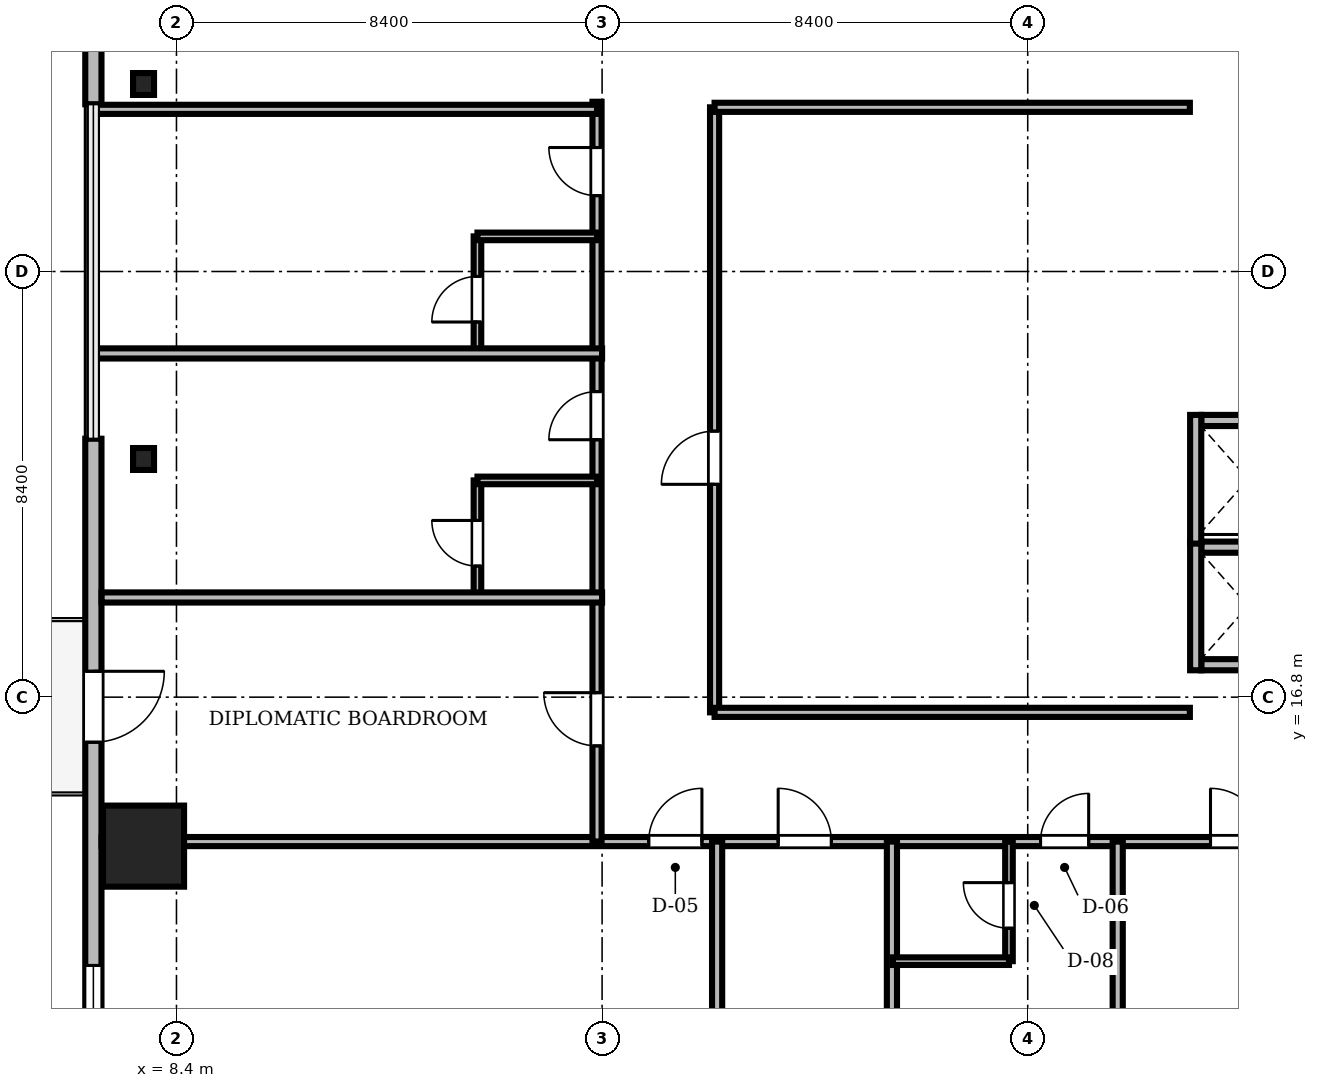
"""IFC4 building model, lengths in metres.
Left out: names, types, materials, properties, quantities, classifications, styles, units other than length and angle.
Written with IfcOpenShell. Run it as: python <this file> out.ifc"""

import sys

from ifc_helpers import new_model, si_unit, direction, frame, frame_2d, origin, origin_2d, place, context, subcontext, project, spatial, rectangle, i_section, extrude, source, transform, mapped, element, fill, save


model = new_model("IFC4")
c1 = context("Model", 3, precision=1e-05, world=origin(), true_north=direction((0.0, 1.0)))
c2 = subcontext(c1, "Body", "Model", "MODEL_VIEW")
j1 = project(units=[si_unit("LENGTHUNIT", "METRE"), si_unit("PLANEANGLEUNIT", "RADIAN")], contexts=[c1])
p1 = place(None, origin())
s1 = spatial("IfcSite", under=j1, at=p1, CompositionType="ELEMENT")
p2 = place(p1, origin())
s2 = spatial("IfcBuilding", under=s1, at=p2, CompositionType="ELEMENT")
p3 = place(p2, frame((0.0, 0.0, 152.0)))
s3 = spatial("IfcBuildingStorey", under=s2, at=p3, CompositionType="ELEMENT", Elevation=152.0)
m1 = source(origin(), c2, "Body", "SweptSolid", [
    extrude(rectangle(XDim=1.6, YDim=1.6, at=origin_2d()), origin(), (0.0, 0.0, 1.0), 3.46),
])
p4 = place(p3, frame((7.75, 13.86, 0.0), z_axis=(0.0, 0.0, 1.0), x_axis=(1.0, 0.0, 0.0)))
e1 = element("IfcColumn", 1, at=p4, inside=s3, PredefinedType="COLUMN", context=c2, shape_type="MappedRepresentation", body=[
    mapped(m1, transform((0.0, 0.0, 0.0), scale=1.0)),
])
m2 = source(origin(), c2, "Body", "SweptSolid", [
    extrude(i_section(OverallWidth=0.414, OverallDepth=0.432, WebThickness=0.026, FlangeThickness=0.04, FilletRadius=0.015, at=origin_2d()), origin(), (0.0, 0.0, 1.0), 3.46),
])
for number, where, z_axis, x_axis in (
    (2, (7.75, 28.9, 0.0), (0.0, 0.0, 1.0), (1.0, 0.0, 0.0)),
    (3, (7.75, 21.5, 0.0), (0.0, 0.0, 1.0), (1.0, 0.0, 0.0)),
):
    element("IfcColumn", number, at=place(p3, frame(where, z_axis=z_axis, x_axis=x_axis)), inside=s3, PredefinedType="COLUMN", context=c2, shape_type="MappedRepresentation", body=[
        mapped(m2, transform((0.0, 0.0, 0.0), scale=1.0)),
    ])
m3 = source(origin(), c2, "Body", "SweptSolid", [
    extrude(rectangle(XDim=15.6, YDim=0.32, at=frame_2d((7.8, 0.0))), origin(), (0.0, 0.0, 1.0), 3.46),
])
p5 = place(p3, frame((6.76, 44.1, 0.0), z_axis=(0.0, 0.0, 1.0), x_axis=(0.0, -1.0, 0.0)))
e4 = element("IfcWall", 4, at=p5, inside=s3, PredefinedType="SOLIDWALL", context=c2, shape_type="MappedRepresentation", body=[
    mapped(m3, transform((0.0, 0.0, 0.0), scale=1.0)),
])
m4 = source(origin(), c2, "Body", "SweptSolid", [
    extrude(rectangle(XDim=2.2, YDim=2.4, at=frame_2d((1.1, 1.2))), frame((0.0, 0.17, 0.0), z_axis=(0.0, -1.0, 0.0), x_axis=(1.0, 0.0, 0.0)), (0.0, 0.0, 1.0), 0.34),
])
p6 = place(p5, frame((3.005, 0.0, 0.72)))
e5 = element("IfcOpeningElement", 5, at=p6, cuts=e4, PredefinedType="OPENING", context=c2, shape_type="MappedRepresentation", body=[
    mapped(m4, transform((0.0, 0.0, 0.0), scale=1.0)),
])
m5 = source(origin(), c2, "Body", "SweptSolid", [
    extrude(rectangle(XDim=15.6, YDim=0.32, at=frame_2d((7.8, 0.0))), origin(), (0.0, 0.0, 1.0), 3.46),
])
p7 = place(p3, frame((6.76, 21.9, 0.0), z_axis=(0.0, 0.0, 1.0), x_axis=(0.0, -1.0, 0.0)))
e6 = element("IfcWall", 6, at=p7, inside=s3, PredefinedType="SOLIDWALL", context=c2, shape_type="MappedRepresentation", body=[
    mapped(m5, transform((0.0, 0.0, 0.0), scale=1.0)),
])
m6 = source(origin(), c2, "Body", "SweptSolid", [
    extrude(rectangle(XDim=1.4, YDim=2.3, at=frame_2d((0.7, 1.15))), frame((0.0, 0.17, 0.0), z_axis=(0.0, -1.0, 0.0), x_axis=(1.0, 0.0, 0.0)), (0.0, 0.0, 1.0), 0.34),
])
p8 = place(p7, frame((4.59, 0.0, 0.0)))
e7 = element("IfcOpeningElement", 7, at=p8, cuts=e6, PredefinedType="OPENING", context=c2, shape_type="MappedRepresentation", body=[
    mapped(m6, transform((0.0, 0.0, 0.0), scale=1.0)),
])
p9 = place(p7, frame((10.395, 0.0, 0.72)))
e8 = element("IfcOpeningElement", 8, at=p9, cuts=e6, PredefinedType="OPENING", context=c2, shape_type="MappedRepresentation", body=[
    mapped(m4, transform((0.0, 0.0, 0.0), scale=1.0)),
])
m7 = source(origin(), c2, "Body", "SweptSolid", [
    extrude(rectangle(XDim=1.85, YDim=0.22, at=frame_2d((0.925, 0.0))), origin(), (0.0, 0.0, 1.0), 3.46),
])
for number, where, z_axis, x_axis in (
    (9, (28.625, 17.44, 0.0), (0.0, 0.0, 1.0), (1.0, 0.0, 0.0)),
    (10, (28.625, 19.76, 0.0), (0.0, 0.0, 1.0), (1.0, 0.0, 0.0)),
):
    element("IfcWall", number, at=place(p3, frame(where, z_axis=z_axis, x_axis=x_axis)), inside=s3, PredefinedType="SOLIDWALL", context=c2, shape_type="MappedRepresentation", body=[
        mapped(m7, transform((0.0, 0.0, 0.0), scale=1.0)),
    ])
m8 = source(origin(), c2, "Body", "SweptSolid", [
    extrude(rectangle(XDim=2.54, YDim=0.22, at=frame_2d((1.27, 0.0))), origin(), (0.0, 0.0, 1.0), 3.46),
])
p10 = place(p3, frame((28.515, 17.33, 0.0), z_axis=(0.0, 0.0, 1.0), x_axis=(0.0, 1.0, 0.0)))
e11 = element("IfcWall", 11, at=p10, inside=s3, PredefinedType="SOLIDWALL", context=c2, shape_type="MappedRepresentation", body=[
    mapped(m8, transform((0.0, 0.0, 0.0), scale=1.0)),
])
p11 = place(p3, frame((28.625, 22.26, 0.0), z_axis=(0.0, 0.0, 1.0), x_axis=(1.0, 0.0, 0.0)))
e12 = element("IfcWall", 12, at=p11, inside=s3, PredefinedType="SOLIDWALL", context=c2, shape_type="MappedRepresentation", body=[
    mapped(m7, transform((0.0, 0.0, 0.0), scale=1.0)),
])
p12 = place(p3, frame((28.515, 19.83, 0.0), z_axis=(0.0, 0.0, 1.0), x_axis=(0.0, 1.0, 0.0)))
e13 = element("IfcWall", 13, at=p12, inside=s3, PredefinedType="SOLIDWALL", context=c2, shape_type="MappedRepresentation", body=[
    mapped(m8, transform((0.0, 0.0, 0.0), scale=1.0)),
])
m9 = source(origin(), c2, "Body", "SweptSolid", [
    extrude(rectangle(XDim=46.156, YDim=0.18, at=frame_2d((23.078, 0.0))), origin(), (0.0, 0.0, 1.0), 2.702),
])
p13 = place(p3, frame((6.922, 13.95, 0.0), z_axis=(0.0, 0.0, 1.0), x_axis=(1.0, 0.0, 0.0)))
e14 = element("IfcWall", 14, at=p13, inside=s3, PredefinedType="PARTITIONING", context=c2, shape_type="MappedRepresentation", body=[
    mapped(m9, transform((0.0, 0.0, 0.0), scale=1.0)),
])
m10 = source(origin(), c2, "Body", "SweptSolid", [
    extrude(rectangle(XDim=1.05, YDim=2.2, at=frame_2d((0.525, 1.1))), frame((0.0, 0.1, 0.0), z_axis=(0.0, -1.0, 0.0), x_axis=(1.0, 0.0, 0.0)), (0.0, 0.0, 1.0), 0.2),
])
p14 = place(p13, frame((10.798, 0.0, 0.0)))
e15 = element("IfcOpeningElement", 15, at=p14, cuts=e14, PredefinedType="OPENING", context=c2, shape_type="MappedRepresentation", body=[
    mapped(m10, transform((0.0, 0.0, 0.0), scale=1.0)),
])
p15 = place(p13, frame((13.353, 0.0, 0.0)))
e16 = element("IfcOpeningElement", 16, at=p15, cuts=e14, PredefinedType="OPENING", context=c2, shape_type="MappedRepresentation", body=[
    mapped(m10, transform((0.0, 0.0, 0.0), scale=1.0)),
])
m11 = source(origin(), c2, "Body", "SweptSolid", [
    extrude(rectangle(XDim=0.95, YDim=2.15, at=frame_2d((0.475, 1.075))), frame((0.0, 0.1, 0.0), z_axis=(0.0, -1.0, 0.0), x_axis=(1.0, 0.0, 0.0)), (0.0, 0.0, 1.0), 0.2),
])
p16 = place(p13, frame((18.531, 0.0, 0.0)))
e17 = element("IfcOpeningElement", 17, at=p16, cuts=e14, PredefinedType="OPENING", context=c2, shape_type="MappedRepresentation", body=[
    mapped(m11, transform((0.0, 0.0, 0.0), scale=1.0)),
])
p17 = place(p13, frame((21.885, 0.0, 0.0)))
e18 = element("IfcOpeningElement", 18, at=p17, cuts=e14, PredefinedType="OPENING", context=c2, shape_type="MappedRepresentation", body=[
    mapped(m10, transform((0.0, 0.0, 0.0), scale=1.0)),
])
p18 = place(p13, frame((26.588, 0.0, 0.0)))
e19 = element("IfcOpeningElement", 19, at=p18, cuts=e14, PredefinedType="OPENING", context=c2, shape_type="MappedRepresentation", body=[
    mapped(m10, transform((0.0, 0.0, 0.0), scale=1.0)),
])
p19 = place(p13, frame((32.516, 0.0, 0.0)))
e20 = element("IfcOpeningElement", 20, at=p19, cuts=e14, PredefinedType="OPENING", context=c2, shape_type="MappedRepresentation", body=[
    mapped(m11, transform((0.0, 0.0, 0.0), scale=1.0)),
])
p20 = place(p13, frame((36.744, 0.0, 0.0)))
e21 = element("IfcOpeningElement", 21, at=p20, cuts=e14, PredefinedType="OPENING", context=c2, shape_type="MappedRepresentation", body=[
    mapped(m10, transform((0.0, 0.0, 0.0), scale=1.0)),
])
p21 = place(p13, frame((41.828, 0.0, 0.0)))
e22 = element("IfcOpeningElement", 22, at=p21, cuts=e14, PredefinedType="OPENING", context=c2, shape_type="MappedRepresentation", body=[
    mapped(m10, transform((0.0, 0.0, 0.0), scale=1.0)),
])
m12 = source(origin(), c2, "Body", "SweptSolid", [
    extrude(rectangle(XDim=14.6, YDim=0.18, at=frame_2d((7.3, 0.0))), origin(), (0.0, 0.0, 1.0), 2.852),
])
p22 = place(p3, frame((16.7, 13.95, 0.0), z_axis=(0.0, 0.0, 1.0), x_axis=(0.0, 1.0, 0.0)))
e23 = element("IfcWall", 23, at=p22, inside=s3, PredefinedType="PARTITIONING", context=c2, shape_type="MappedRepresentation", body=[
    mapped(m12, transform((0.0, 0.0, 0.0), scale=1.0)),
])
p23 = place(p22, frame((1.888, 0.0, 0.0)))
e24 = element("IfcOpeningElement", 24, at=p23, cuts=e23, PredefinedType="OPENING", context=c2, shape_type="MappedRepresentation", body=[
    mapped(m10, transform((0.0, 0.0, 0.0), scale=1.0)),
])
p24 = place(p22, frame((7.93, 0.0, 0.0)))
e25 = element("IfcOpeningElement", 25, at=p24, cuts=e23, PredefinedType="OPENING", context=c2, shape_type="MappedRepresentation", body=[
    mapped(m11, transform((0.0, 0.0, 0.0), scale=1.0)),
])
p25 = place(p22, frame((12.747, 0.0, 0.0)))
e26 = element("IfcOpeningElement", 26, at=p25, cuts=e23, PredefinedType="OPENING", context=c2, shape_type="MappedRepresentation", body=[
    mapped(m11, transform((0.0, 0.0, 0.0), scale=1.0)),
])
m13 = source(origin(), c2, "Body", "SweptSolid", [
    extrude(rectangle(XDim=11.94, YDim=0.18, at=frame_2d((5.97, 0.0))), origin(), (0.0, 0.0, 1.0), 2.852),
])
p26 = place(p3, frame((19.02, 16.5, 0.0), z_axis=(0.0, 0.0, 1.0), x_axis=(0.0, 1.0, 0.0)))
e27 = element("IfcWall", 27, at=p26, inside=s3, PredefinedType="PARTITIONING", context=c2, shape_type="MappedRepresentation", body=[
    mapped(m13, transform((0.0, 0.0, 0.0), scale=1.0)),
])
p27 = place(p26, frame((4.5, 0.0, 0.0)))
e28 = element("IfcOpeningElement", 28, at=p27, cuts=e27, PredefinedType="OPENING", context=c2, shape_type="MappedRepresentation", body=[
    mapped(m10, transform((0.0, 0.0, 0.0), scale=1.0)),
])
m14 = source(origin(), c2, "Body", "SweptSolid", [
    extrude(rectangle(XDim=2.36, YDim=0.15, at=frame_2d((1.18, 0.0))), origin(), (0.0, 0.0, 1.0), 3.122),
])
p28 = place(p3, frame((24.83, 11.59, 0.0), z_axis=(0.0, 0.0, 1.0), x_axis=(0.0, 1.0, 0.0)))
e29 = element("IfcWall", 29, at=p28, inside=s3, PredefinedType="PARTITIONING", context=c2, shape_type="MappedRepresentation", body=[
    mapped(m14, transform((0.0, 0.0, 0.0), scale=1.0)),
])
m15 = source(origin(), c2, "Body", "SweptSolid", [
    extrude(rectangle(XDim=0.9, YDim=2.1, at=frame_2d((0.45, 1.05))), frame((0.0, 0.085, 0.0), z_axis=(0.0, -1.0, 0.0), x_axis=(1.0, 0.0, 0.0)), (0.0, 0.0, 1.0), 0.17),
])
p29 = place(p28, frame((0.65, 0.0, 0.0)))
e30 = element("IfcOpeningElement", 30, at=p29, cuts=e29, PredefinedType="OPENING", context=c2, shape_type="MappedRepresentation", body=[
    mapped(m15, transform((0.0, 0.0, 0.0), scale=1.0)),
])
m16 = source(origin(), c2, "Body", "SweptSolid", [
    extrude(rectangle(XDim=2.29, YDim=0.15, at=frame_2d((1.145, 0.0))), origin(), (0.0, 0.0, 1.0), 2.852),
])
p30 = place(p3, frame((14.34, 18.787, 0.0), z_axis=(0.0, 0.0, 1.0), x_axis=(0.0, 1.0, 0.0)))
e31 = element("IfcWall", 31, at=p30, inside=s3, PredefinedType="PARTITIONING", context=c2, shape_type="MappedRepresentation", body=[
    mapped(m16, transform((0.0, 0.0, 0.0), scale=1.0)),
])
p31 = place(p30, frame((0.6, 0.0, 0.0)))
e32 = element("IfcOpeningElement", 32, at=p31, cuts=e31, PredefinedType="OPENING", context=c2, shape_type="MappedRepresentation", body=[
    mapped(m15, transform((0.0, 0.0, 0.0), scale=1.0)),
])
m17 = source(origin(), c2, "Body", "SweptSolid", [
    extrude(rectangle(XDim=2.29, YDim=0.15, at=frame_2d((1.145, 0.0))), origin(), (0.0, 0.0, 1.0), 3.122),
])
p32 = place(p3, frame((14.34, 23.603, 0.0), z_axis=(0.0, 0.0, 1.0), x_axis=(0.0, 1.0, 0.0)))
e33 = element("IfcWall", 33, at=p32, inside=s3, PredefinedType="PARTITIONING", context=c2, shape_type="MappedRepresentation", body=[
    mapped(m17, transform((0.0, 0.0, 0.0), scale=1.0)),
])
p33 = place(p32, frame((0.6, 0.0, 0.0)))
e34 = element("IfcOpeningElement", 34, at=p33, cuts=e33, PredefinedType="OPENING", context=c2, shape_type="MappedRepresentation", body=[
    mapped(m15, transform((0.0, 0.0, 0.0), scale=1.0)),
])
m18 = source(origin(), c2, "Body", "SweptSolid", [
    extrude(rectangle(XDim=11.828, YDim=0.2, at=frame_2d((5.914, 0.0))), origin(), (0.0, 0.0, 1.0), 2.702),
])
for number, where, z_axis, x_axis in (
    (35, (19.07, 2.122, 0.0), (0.0, 0.0, 1.0), (0.0, 1.0, 0.0)),
    (36, (22.52, 2.122, 0.0), (0.0, 0.0, 1.0), (0.0, 1.0, 0.0)),
):
    element("IfcWall", number, at=place(p3, frame(where, z_axis=z_axis, x_axis=x_axis)), inside=s3, PredefinedType="PARTITIONING", context=c2, shape_type="MappedRepresentation", body=[
        mapped(m18, transform((0.0, 0.0, 0.0), scale=1.0)),
    ])
m19 = source(origin(), c2, "Body", "SweptSolid", [
    extrude(rectangle(XDim=12.02, YDim=0.2, at=frame_2d((6.01, 0.0))), origin(), (0.0, 0.0, 1.0), 2.702),
])
p34 = place(p3, frame((26.976, 1.93, 0.0), z_axis=(0.0, 0.0, 1.0), x_axis=(0.0, 1.0, 0.0)))
e37 = element("IfcWall", 37, at=p34, inside=s3, PredefinedType="PARTITIONING", context=c2, shape_type="MappedRepresentation", body=[
    mapped(m19, transform((0.0, 0.0, 0.0), scale=1.0)),
])
m20 = source(origin(), c2, "Body", "SweptSolid", [
    extrude(rectangle(XDim=9.878, YDim=0.2, at=frame_2d((4.939, 0.0))), origin(), (0.0, 0.0, 1.0), 2.702),
])
p35 = place(p3, frame((6.922, 18.767, 0.0), z_axis=(0.0, 0.0, 1.0), x_axis=(1.0, 0.0, 0.0)))
e38 = element("IfcWall", 38, at=p35, inside=s3, PredefinedType="PARTITIONING", context=c2, shape_type="MappedRepresentation", body=[
    mapped(m20, transform((0.0, 0.0, 0.0), scale=1.0)),
])
m21 = source(origin(), c2, "Body", "SweptSolid", [
    extrude(rectangle(XDim=10.07, YDim=0.2, at=frame_2d((5.035, 0.0))), origin(), (0.0, 0.0, 1.0), 2.702),
])
p36 = place(p3, frame((6.73, 23.583, 0.0), z_axis=(0.0, 0.0, 1.0), x_axis=(1.0, 0.0, 0.0)))
e39 = element("IfcWall", 39, at=p36, inside=s3, PredefinedType="PARTITIONING", context=c2, shape_type="MappedRepresentation", body=[
    mapped(m21, transform((0.0, 0.0, 0.0), scale=1.0)),
])
m22 = source(origin(), c2, "Body", "SweptSolid", [
    extrude(rectangle(XDim=9.97, YDim=0.18, at=frame_2d((4.985, 0.0))), origin(), (0.0, 0.0, 1.0), 2.702),
])
p37 = place(p3, frame((6.73, 28.4, 0.0), z_axis=(0.0, 0.0, 1.0), x_axis=(1.0, 0.0, 0.0)))
e40 = element("IfcWall", 40, at=p37, inside=s3, PredefinedType="PARTITIONING", context=c2, shape_type="MappedRepresentation", body=[
    mapped(m22, transform((0.0, 0.0, 0.0), scale=1.0)),
])
m23 = source(origin(), c2, "Body", "SweptSolid", [
    extrude(rectangle(XDim=9.38, YDim=0.18, at=frame_2d((4.69, 0.0))), origin(), (0.0, 0.0, 1.0), 3.46),
])
for number, where, z_axis, x_axis in (
    (41, (19.02, 16.5, 0.0), (0.0, 0.0, 1.0), (1.0, 0.0, 0.0)),
    (42, (19.02, 28.44, 0.0), (0.0, 0.0, 1.0), (1.0, 0.0, 0.0)),
):
    element("IfcWall", number, at=place(p3, frame(where, z_axis=z_axis, x_axis=x_axis)), inside=s3, PredefinedType="PARTITIONING", context=c2, shape_type="MappedRepresentation", body=[
        mapped(m23, transform((0.0, 0.0, 0.0), scale=1.0)),
    ])
m24 = source(origin(), c2, "Body", "SweptSolid", [
    extrude(rectangle(XDim=2.36, YDim=0.15, at=frame_2d((1.18, 0.0))), origin(), (0.0, 0.0, 1.0), 3.46),
])
for number, where, z_axis, x_axis in (
    (43, (14.34, 21.077, 0.0), (0.0, 0.0, 1.0), (1.0, 0.0, 0.0)),
    (44, (14.34, 25.893, 0.0), (0.0, 0.0, 1.0), (1.0, 0.0, 0.0)),
):
    element("IfcWall", number, at=place(p3, frame(where, z_axis=z_axis, x_axis=x_axis)), inside=s3, PredefinedType="PARTITIONING", context=c2, shape_type="MappedRepresentation", body=[
        mapped(m24, transform((0.0, 0.0, 0.0), scale=1.0)),
    ])
m25 = source(origin(), c2, "Body", "SweptSolid", [
    extrude(rectangle(XDim=2.29, YDim=0.15, at=frame_2d((1.145, 0.0))), origin(), (0.0, 0.0, 1.0), 3.46),
])
p38 = place(p3, frame((22.54, 11.59, 0.0), z_axis=(0.0, 0.0, 1.0), x_axis=(1.0, 0.0, 0.0)))
e45 = element("IfcWall", 45, at=p38, inside=s3, PredefinedType="PARTITIONING", context=c2, shape_type="MappedRepresentation", body=[
    mapped(m25, transform((0.0, 0.0, 0.0), scale=1.0)),
])
m26 = source(origin(), c2, "Body", "SweptSolid", [
    extrude(rectangle(XDim=1.4, YDim=2.3, at=frame_2d((0.7, 1.15))), frame((0.0, 0.025, 0.0), z_axis=(0.0, -1.0, 0.0), x_axis=(1.0, 0.0, 0.0)), (0.0, 0.0, 1.0), 0.05),
])
p39 = place(p8, frame((1.4, 0.0, 0.0), z_axis=(0.0, 0.0, 1.0), x_axis=(-1.0, 0.0, 0.0)))
e46 = element("IfcDoor", 46, at=p39, inside=s3, OperationType="DOUBLE_DOOR_SLIDING", PredefinedType="DOOR", context=c2, shape_type="MappedRepresentation", body=[
    mapped(m26, transform((0.0, 0.0, 0.0), scale=1.0)),
])
fill(e7, e46)
m27 = source(origin(), c2, "Body", "SweptSolid", [
    extrude(rectangle(XDim=2.2, YDim=2.4, at=frame_2d((1.1, 1.2))), frame((0.0, 0.03, 0.0), z_axis=(0.0, -1.0, 0.0), x_axis=(1.0, 0.0, 0.0)), (0.0, 0.0, 1.0), 0.06),
])
p40 = place(p9, origin())
e47 = element("IfcWindow", 47, at=p40, inside=s3, PartitioningType="SINGLE_PANEL", PredefinedType="WINDOW", context=c2, shape_type="MappedRepresentation", body=[
    mapped(m27, transform((0.0, 0.0, 0.0), scale=1.0)),
])
fill(e8, e47)
m28 = source(origin(), c2, "Body", "SweptSolid", [
    extrude(rectangle(XDim=1.05, YDim=2.2, at=frame_2d((0.525, 1.1))), frame((0.0, 0.025, 0.0), z_axis=(0.0, -1.0, 0.0), x_axis=(1.0, 0.0, 0.0)), (0.0, 0.0, 1.0), 0.05),
])
p41 = place(p14, origin())
e48 = element("IfcDoor", 48, at=p41, inside=s3, OperationType="SINGLE_SWING_RIGHT", PredefinedType="DOOR", context=c2, shape_type="MappedRepresentation", body=[
    mapped(m28, transform((0.0, 0.0, 0.0), scale=1.0)),
])
fill(e15, e48)
p42 = place(p15, origin())
e49 = element("IfcDoor", 49, at=p42, inside=s3, OperationType="SINGLE_SWING_LEFT", PredefinedType="DOOR", context=c2, shape_type="MappedRepresentation", body=[
    mapped(m28, transform((0.0, 0.0, 0.0), scale=1.0)),
])
fill(e16, e49)
m29 = source(origin(), c2, "Body", "SweptSolid", [
    extrude(rectangle(XDim=0.95, YDim=2.15, at=frame_2d((0.475, 1.075))), frame((0.0, 0.025, 0.0), z_axis=(0.0, -1.0, 0.0), x_axis=(1.0, 0.0, 0.0)), (0.0, 0.0, 1.0), 0.05),
])
p43 = place(p16, origin())
e50 = element("IfcDoor", 50, at=p43, inside=s3, OperationType="SINGLE_SWING_RIGHT", PredefinedType="DOOR", context=c2, shape_type="MappedRepresentation", body=[
    mapped(m29, transform((0.0, 0.0, 0.0), scale=1.0)),
])
fill(e17, e50)
p44 = place(p17, origin())
e51 = element("IfcDoor", 51, at=p44, inside=s3, OperationType="SINGLE_SWING_LEFT", PredefinedType="DOOR", context=c2, shape_type="MappedRepresentation", body=[
    mapped(m28, transform((0.0, 0.0, 0.0), scale=1.0)),
])
fill(e18, e51)
p45 = place(p23, origin())
e52 = element("IfcDoor", 52, at=p45, inside=s3, OperationType="SINGLE_SWING_RIGHT", PredefinedType="DOOR", context=c2, shape_type="MappedRepresentation", body=[
    mapped(m28, transform((0.0, 0.0, 0.0), scale=1.0)),
])
fill(e24, e52)
p46 = place(p24, origin())
e53 = element("IfcDoor", 53, at=p46, inside=s3, OperationType="SINGLE_SWING_LEFT", PredefinedType="DOOR", context=c2, shape_type="MappedRepresentation", body=[
    mapped(m29, transform((0.0, 0.0, 0.0), scale=1.0)),
])
fill(e25, e53)
p47 = place(p25, origin())
e54 = element("IfcDoor", 54, at=p47, inside=s3, OperationType="SINGLE_SWING_RIGHT", PredefinedType="DOOR", context=c2, shape_type="MappedRepresentation", body=[
    mapped(m29, transform((0.0, 0.0, 0.0), scale=1.0)),
])
fill(e26, e54)
p48 = place(p27, origin())
e55 = element("IfcDoor", 55, at=p48, inside=s3, OperationType="SINGLE_SWING_LEFT", PredefinedType="DOOR", context=c2, shape_type="MappedRepresentation", body=[
    mapped(m28, transform((0.0, 0.0, 0.0), scale=1.0)),
])
fill(e28, e55)
m30 = source(origin(), c2, "Body", "SweptSolid", [
    extrude(rectangle(XDim=0.9, YDim=2.1, at=frame_2d((0.45, 1.05))), frame((0.0, 0.025, 0.0), z_axis=(0.0, -1.0, 0.0), x_axis=(1.0, 0.0, 0.0)), (0.0, 0.0, 1.0), 0.05),
])
p49 = place(p29, origin())
e56 = element("IfcDoor", 56, at=p49, inside=s3, OperationType="SINGLE_SWING_RIGHT", PredefinedType="DOOR", context=c2, shape_type="MappedRepresentation", body=[
    mapped(m30, transform((0.0, 0.0, 0.0), scale=1.0)),
])
fill(e30, e56)
p50 = place(p31, origin())
e57 = element("IfcDoor", 57, at=p50, inside=s3, OperationType="SINGLE_SWING_RIGHT", PredefinedType="DOOR", context=c2, shape_type="MappedRepresentation", body=[
    mapped(m30, transform((0.0, 0.0, 0.0), scale=1.0)),
])
fill(e32, e57)
p51 = place(p33, origin())
e58 = element("IfcDoor", 58, at=p51, inside=s3, OperationType="SINGLE_SWING_LEFT", PredefinedType="DOOR", context=c2, shape_type="MappedRepresentation", body=[
    mapped(m30, transform((0.0, 0.0, 0.0), scale=1.0)),
])
fill(e34, e58)
save(model, sys.argv[1])
